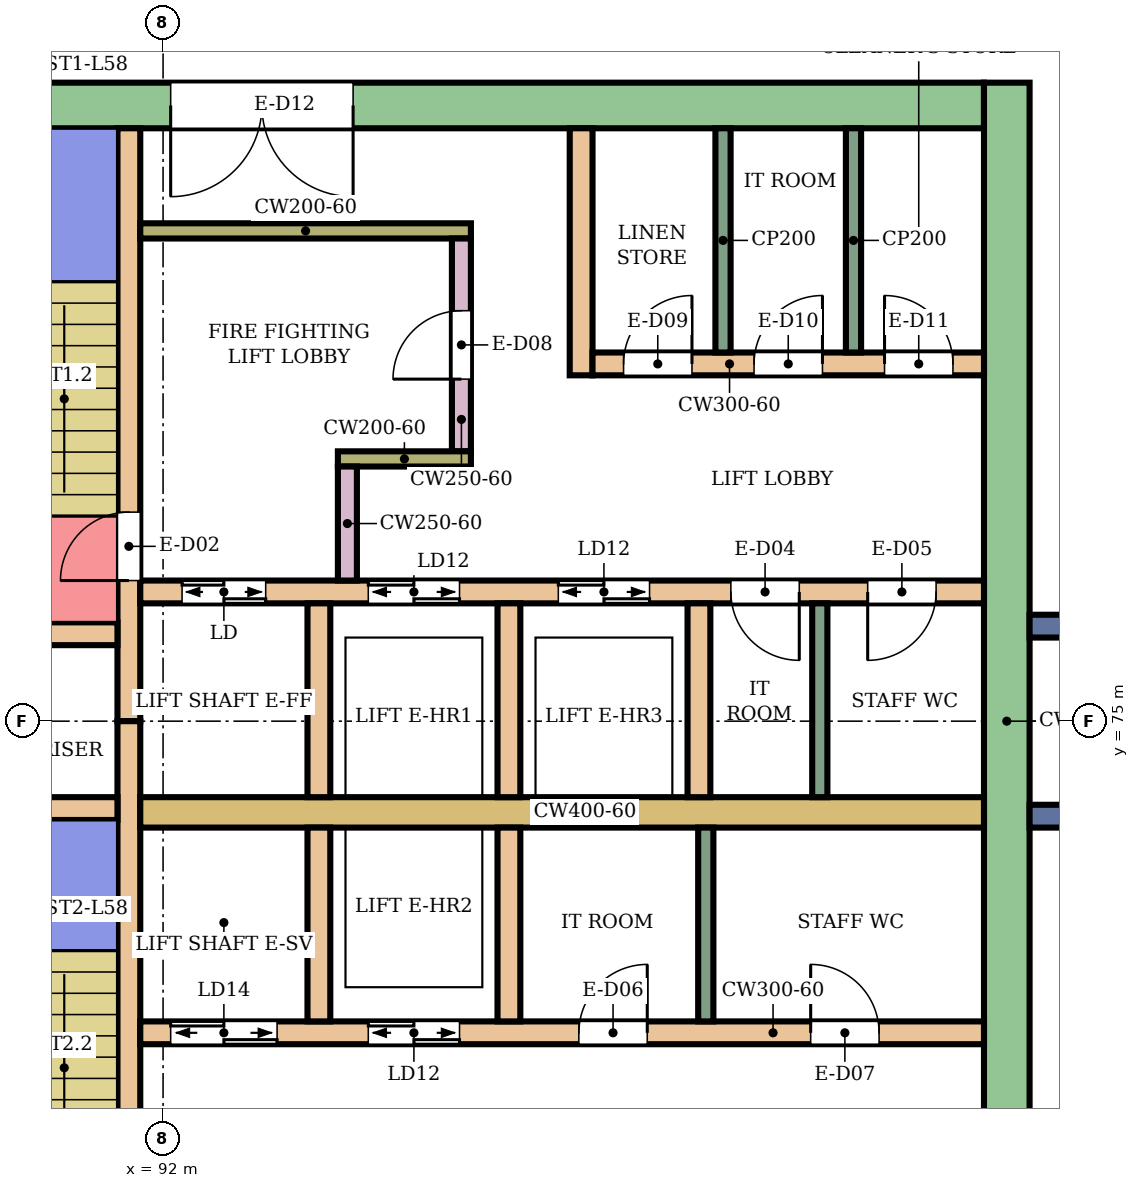
"""IFC4 building model, lengths in metres.
Left out: names, types, materials, properties, quantities, classifications, styles, units other than length and angle.
Written with IfcOpenShell. Run it as: python <this file> out.ifc"""

import sys

from ifc_helpers import new_model, si_unit, direction, frame, frame_2d, origin, place, context, subcontext, project, spatial, rectangle, extrude, element, fill, save


model = new_model("IFC4")
c1 = context("Model", 3, precision=1e-05, world=origin(), true_north=direction((0.0, 1.0)))
c2 = subcontext(c1, "Body", "Model", "MODEL_VIEW")
j1 = project(units=[si_unit("LENGTHUNIT", "METRE"), si_unit("PLANEANGLEUNIT", "RADIAN")], contexts=[c1])
p1 = place(None, origin())
s1 = spatial("IfcSite", under=j1, at=p1, CompositionType="ELEMENT")
p2 = place(p1, origin())
s2 = spatial("IfcBuilding", under=s1, at=p2, CompositionType="ELEMENT")
p3 = place(p2, frame((0.0, 0.0, 254.1)))
s3 = spatial("IfcBuildingStorey", under=s2, at=p3, CompositionType="ELEMENT", Elevation=254.1)
p4 = place(p3, frame((87.9, 83.1, 0.0), z_axis=(0.0, 0.0, 1.0), x_axis=(1.0, 0.0, 0.0)))
e1 = element("IfcWall", 1, at=p4, inside=s3, PredefinedType="SHEAR", context=c2, shape_type="SweptSolid", body=[
    extrude(rectangle(XDim=14.9, YDim=0.6, at=frame_2d((7.45, 0.0))), origin(), (0.0, 0.0, 1.0), 3.88),
])
p5 = place(p4, frame((4.2, 0.0, 0.0)))
e2 = element("IfcOpeningElement", 2, at=p5, cuts=e1, PredefinedType="OPENING", context=c2, shape_type="SweptSolid", body=[
    extrude(rectangle(XDim=2.4, YDim=2.4, at=frame_2d((1.2, 1.2))), frame((0.0, 0.31, 0.0), z_axis=(0.0, -1.0, 0.0), x_axis=(1.0, 0.0, 0.0)), (0.0, 0.0, 1.0), 0.62),
])
p6 = place(p3, frame((103.1, 66.6, 0.0), z_axis=(0.0, 0.0, 1.0), x_axis=(0.0, 1.0, 0.0)))
e3 = element("IfcWall", 3, at=p6, inside=s3, PredefinedType="SHEAR", context=c2, shape_type="SweptSolid", body=[
    extrude(rectangle(XDim=16.8, YDim=0.6, at=frame_2d((8.4, 0.0))), origin(), (0.0, 0.0, 1.0), 3.88),
])
p7 = place(p3, frame((91.55, 75.0, 0.0), z_axis=(0.0, 0.0, 1.0), x_axis=(0.0, 1.0, 0.0)))
e4 = element("IfcWall", 4, at=p7, inside=s3, PredefinedType="SHEAR", context=c2, shape_type="SweptSolid", body=[
    extrude(rectangle(XDim=7.8, YDim=0.3, at=frame_2d((3.9, 0.0))), origin(), (0.0, 0.0, 1.0), 3.88),
])
p8 = place(p7, frame((1.85, 0.0, 0.0)))
e5 = element("IfcOpeningElement", 5, at=p8, cuts=e4, PredefinedType="OPENING", context=c2, shape_type="SweptSolid", body=[
    extrude(rectangle(XDim=0.9, YDim=2.1, at=frame_2d((0.45, 1.05))), frame((0.0, 0.16, 0.0), z_axis=(0.0, -1.0, 0.0), x_axis=(1.0, 0.0, 0.0)), (0.0, 0.0, 1.0), 0.32),
])
p9 = place(p3, frame((91.55, 67.2, 0.0), z_axis=(0.0, 0.0, 1.0), x_axis=(0.0, 1.0, 0.0)))
e6 = element("IfcWall", 6, at=p9, inside=s3, PredefinedType="SHEAR", context=c2, shape_type="SweptSolid", body=[
    extrude(rectangle(XDim=7.8, YDim=0.3, at=frame_2d((3.9, 0.0))), origin(), (0.0, 0.0, 1.0), 3.88),
])
p10 = place(p9, frame((0.45, 0.0, 0.0)))
e7 = element("IfcOpeningElement", 7, at=p10, cuts=e6, PredefinedType="OPENING", context=c2, shape_type="SweptSolid", body=[
    extrude(rectangle(XDim=0.9, YDim=2.1, at=frame_2d((0.45, 1.05))), frame((0.0, 0.16, 0.0), z_axis=(0.0, -1.0, 0.0), x_axis=(1.0, 0.0, 0.0)), (0.0, 0.0, 1.0), 0.32),
])
p11 = place(p3, frame((88.35, 76.15, 0.0), z_axis=(0.0, 0.0, 1.0), x_axis=(1.0, 0.0, 0.0)))
e8 = element("IfcWall", 8, at=p11, inside=s3, PredefinedType="SHEAR", context=c2, shape_type="SweptSolid", body=[
    extrude(rectangle(XDim=3.05, YDim=0.3, at=frame_2d((1.525, 0.0))), origin(), (0.0, 0.0, 1.0), 3.88),
])
p12 = place(p11, frame((1.1, 0.0, 0.0)))
e9 = element("IfcOpeningElement", 9, at=p12, cuts=e8, PredefinedType="OPENING", context=c2, shape_type="SweptSolid", body=[
    extrude(rectangle(XDim=0.7, YDim=2.0, at=frame_2d((0.35, 1.0))), frame((0.0, 0.16, 0.0), z_axis=(0.0, -1.0, 0.0), x_axis=(1.0, 0.0, 0.0)), (0.0, 0.0, 1.0), 0.32),
])
p13 = place(p3, frame((88.35, 73.85, 0.0), z_axis=(0.0, 0.0, 1.0), x_axis=(1.0, 0.0, 0.0)))
e10 = element("IfcWall", 10, at=p13, inside=s3, PredefinedType="SHEAR", context=c2, shape_type="SweptSolid", body=[
    extrude(rectangle(XDim=3.05, YDim=0.3, at=frame_2d((1.525, 0.0))), origin(), (0.0, 0.0, 1.0), 3.88),
])
p14 = place(p3, frame((91.7, 76.7, 0.0), z_axis=(0.0, 0.0, 1.0), x_axis=(1.0, 0.0, 0.0)))
e11 = element("IfcWall", 11, at=p14, inside=s3, PredefinedType="SHEAR", context=c2, shape_type="SweptSolid", body=[
    extrude(rectangle(XDim=11.1, YDim=0.3, at=frame_2d((5.55, 0.0))), origin(), (0.0, 0.0, 1.0), 3.88),
])
p15 = place(p14, frame((0.55, 0.0, 0.0)))
e12 = element("IfcOpeningElement", 12, at=p15, cuts=e11, PredefinedType="OPENING", context=c2, shape_type="SweptSolid", body=[
    extrude(rectangle(XDim=1.1, YDim=2.1, at=frame_2d((0.55, 1.05))), frame((0.0, 0.16, 0.0), z_axis=(0.0, -1.0, 0.0), x_axis=(1.0, 0.0, 0.0)), (0.0, 0.0, 1.0), 0.32),
])
p16 = place(p14, frame((3.0, 0.0, 0.0)))
e13 = element("IfcOpeningElement", 13, at=p16, cuts=e11, PredefinedType="OPENING", context=c2, shape_type="SweptSolid", body=[
    extrude(rectangle(XDim=1.2, YDim=2.1, at=frame_2d((0.6, 1.05))), frame((0.0, 0.16, 0.0), z_axis=(0.0, -1.0, 0.0), x_axis=(1.0, 0.0, 0.0)), (0.0, 0.0, 1.0), 0.32),
])
p17 = place(p14, frame((5.5, 0.0, 0.0)))
e14 = element("IfcOpeningElement", 14, at=p17, cuts=e11, PredefinedType="OPENING", context=c2, shape_type="SweptSolid", body=[
    extrude(rectangle(XDim=1.2, YDim=2.1, at=frame_2d((0.6, 1.05))), frame((0.0, 0.16, 0.0), z_axis=(0.0, -1.0, 0.0), x_axis=(1.0, 0.0, 0.0)), (0.0, 0.0, 1.0), 0.32),
])
p18 = place(p14, frame((7.77, 0.0, 0.0)))
e15 = element("IfcOpeningElement", 15, at=p18, cuts=e11, PredefinedType="OPENING", context=c2, shape_type="SweptSolid", body=[
    extrude(rectangle(XDim=0.9, YDim=2.1, at=frame_2d((0.45, 1.05))), frame((0.0, 0.16, 0.0), z_axis=(0.0, -1.0, 0.0), x_axis=(1.0, 0.0, 0.0)), (0.0, 0.0, 1.0), 0.32),
])
p19 = place(p14, frame((9.57, 0.0, 0.0)))
e16 = element("IfcOpeningElement", 16, at=p19, cuts=e11, PredefinedType="OPENING", context=c2, shape_type="SweptSolid", body=[
    extrude(rectangle(XDim=0.9, YDim=2.1, at=frame_2d((0.45, 1.05))), frame((0.0, 0.16, 0.0), z_axis=(0.0, -1.0, 0.0), x_axis=(1.0, 0.0, 0.0)), (0.0, 0.0, 1.0), 0.32),
])
p20 = place(p3, frame((91.7, 73.8, 0.0), z_axis=(0.0, 0.0, 1.0), x_axis=(1.0, 0.0, 0.0)))
e17 = element("IfcWall", 17, at=p20, inside=s3, PredefinedType="SHEAR", context=c2, shape_type="SweptSolid", body=[
    extrude(rectangle(XDim=11.1, YDim=0.4, at=frame_2d((5.55, 0.0))), origin(), (0.0, 0.0, 1.0), 3.88),
])
p21 = place(p3, frame((91.7, 70.9, 0.0), z_axis=(0.0, 0.0, 1.0), x_axis=(1.0, 0.0, 0.0)))
e18 = element("IfcWall", 18, at=p21, inside=s3, PredefinedType="SHEAR", context=c2, shape_type="SweptSolid", body=[
    extrude(rectangle(XDim=11.1, YDim=0.3, at=frame_2d((5.55, 0.0))), origin(), (0.0, 0.0, 1.0), 3.88),
])
p22 = place(p21, frame((0.4, 0.0, 0.0)))
e19 = element("IfcOpeningElement", 19, at=p22, cuts=e18, PredefinedType="OPENING", context=c2, shape_type="SweptSolid", body=[
    extrude(rectangle(XDim=1.4, YDim=2.1, at=frame_2d((0.7, 1.05))), frame((0.0, 0.16, 0.0), z_axis=(0.0, -1.0, 0.0), x_axis=(1.0, 0.0, 0.0)), (0.0, 0.0, 1.0), 0.32),
])
p23 = place(p21, frame((3.0, 0.0, 0.0)))
e20 = element("IfcOpeningElement", 20, at=p23, cuts=e18, PredefinedType="OPENING", context=c2, shape_type="SweptSolid", body=[
    extrude(rectangle(XDim=1.2, YDim=2.1, at=frame_2d((0.6, 1.05))), frame((0.0, 0.16, 0.0), z_axis=(0.0, -1.0, 0.0), x_axis=(1.0, 0.0, 0.0)), (0.0, 0.0, 1.0), 0.32),
])
p24 = place(p21, frame((5.77, 0.0, 0.0)))
e21 = element("IfcOpeningElement", 21, at=p24, cuts=e18, PredefinedType="OPENING", context=c2, shape_type="SweptSolid", body=[
    extrude(rectangle(XDim=0.9, YDim=2.1, at=frame_2d((0.45, 1.05))), frame((0.0, 0.16, 0.0), z_axis=(0.0, -1.0, 0.0), x_axis=(1.0, 0.0, 0.0)), (0.0, 0.0, 1.0), 0.32),
])
p25 = place(p21, frame((8.82, 0.0, 0.0)))
e22 = element("IfcOpeningElement", 22, at=p25, cuts=e18, PredefinedType="OPENING", context=c2, shape_type="SweptSolid", body=[
    extrude(rectangle(XDim=0.9, YDim=2.1, at=frame_2d((0.45, 1.05))), frame((0.0, 0.16, 0.0), z_axis=(0.0, -1.0, 0.0), x_axis=(1.0, 0.0, 0.0)), (0.0, 0.0, 1.0), 0.32),
])
for number, where, z_axis, x_axis in (
    (23, (94.05, 74.0, 0.0), (0.0, 0.0, 1.0), (0.0, 1.0, 0.0)),
    (24, (96.55, 74.0, 0.0), (0.0, 0.0, 1.0), (0.0, 1.0, 0.0)),
    (25, (99.05, 74.0, 0.0), (0.0, 0.0, 1.0), (0.0, 1.0, 0.0)),
    (26, (94.05, 71.05, 0.0), (0.0, 0.0, 1.0), (0.0, 1.0, 0.0)),
    (27, (96.55, 71.05, 0.0), (0.0, 0.0, 1.0), (0.0, 1.0, 0.0)),
):
    element("IfcWall", number, at=place(p3, frame(where, z_axis=z_axis, x_axis=x_axis)), inside=s3, PredefinedType="SHEAR", context=c2, shape_type="SweptSolid", body=[
        extrude(rectangle(XDim=2.55, YDim=0.3, at=frame_2d((1.275, 0.0))), origin(), (0.0, 0.0, 1.0), 3.88),
    ])
p26 = place(p3, frame((91.7, 81.45, 0.0), z_axis=(0.0, 0.0, 1.0), x_axis=(1.0, 0.0, 0.0)))
e28 = element("IfcWall", 28, at=p26, inside=s3, PredefinedType="SHEAR", context=c2, shape_type="SweptSolid", body=[
    extrude(rectangle(XDim=4.35, YDim=0.2, at=frame_2d((2.175, 0.0))), origin(), (0.0, 0.0, 1.0), 3.88),
])
p27 = place(p3, frame((95.925, 78.55, 0.0), z_axis=(0.0, 0.0, 1.0), x_axis=(0.0, 1.0, 0.0)))
e29 = element("IfcWall", 29, at=p27, inside=s3, PredefinedType="SHEAR", context=c2, shape_type="SweptSolid", body=[
    extrude(rectangle(XDim=2.8, YDim=0.25, at=frame_2d((1.4, 0.0))), origin(), (0.0, 0.0, 1.0), 3.88),
])
p28 = place(p27, frame((0.95, 0.0, 0.0)))
e30 = element("IfcOpeningElement", 30, at=p28, cuts=e29, PredefinedType="OPENING", context=c2, shape_type="SweptSolid", body=[
    extrude(rectangle(XDim=0.9, YDim=2.1, at=frame_2d((0.45, 1.05))), frame((0.0, 0.135, 0.0), z_axis=(0.0, -1.0, 0.0), x_axis=(1.0, 0.0, 0.0)), (0.0, 0.0, 1.0), 0.27),
])
p29 = place(p3, frame((94.3, 78.45, 0.0), z_axis=(0.0, 0.0, 1.0), x_axis=(1.0, 0.0, 0.0)))
e31 = element("IfcWall", 31, at=p29, inside=s3, PredefinedType="SHEAR", context=c2, shape_type="SweptSolid", body=[
    extrude(rectangle(XDim=1.75, YDim=0.2, at=frame_2d((0.875, 0.0))), origin(), (0.0, 0.0, 1.0), 3.88),
])
p30 = place(p3, frame((94.425, 76.85, 0.0), z_axis=(0.0, 0.0, 1.0), x_axis=(0.0, 1.0, 0.0)))
e32 = element("IfcWall", 32, at=p30, inside=s3, PredefinedType="SHEAR", context=c2, shape_type="SweptSolid", body=[
    extrude(rectangle(XDim=1.5, YDim=0.25, at=frame_2d((0.75, 0.0))), origin(), (0.0, 0.0, 1.0), 3.88),
])
p31 = place(p3, frame((97.5, 79.55, 0.0), z_axis=(0.0, 0.0, 1.0), x_axis=(0.0, 1.0, 0.0)))
e33 = element("IfcWall", 33, at=p31, inside=s3, PredefinedType="SHEAR", context=c2, shape_type="SweptSolid", body=[
    extrude(rectangle(XDim=3.25, YDim=0.3, at=frame_2d((1.625, 0.0))), origin(), (0.0, 0.0, 1.0), 3.88),
])
p32 = place(p3, frame((97.65, 79.7, 0.0), z_axis=(0.0, 0.0, 1.0), x_axis=(1.0, 0.0, 0.0)))
e34 = element("IfcWall", 34, at=p32, inside=s3, PredefinedType="SHEAR", context=c2, shape_type="SweptSolid", body=[
    extrude(rectangle(XDim=5.15, YDim=0.3, at=frame_2d((2.575, 0.0))), origin(), (0.0, 0.0, 1.0), 3.88),
])
p33 = place(p32, frame((0.408, 0.0, 0.0)))
e35 = element("IfcOpeningElement", 35, at=p33, cuts=e34, PredefinedType="OPENING", context=c2, shape_type="SweptSolid", body=[
    extrude(rectangle(XDim=0.9, YDim=2.1, at=frame_2d((0.45, 1.05))), frame((0.0, 0.16, 0.0), z_axis=(0.0, -1.0, 0.0), x_axis=(1.0, 0.0, 0.0)), (0.0, 0.0, 1.0), 0.32),
])
p34 = place(p32, frame((2.125, 0.0, 0.0)))
e36 = element("IfcOpeningElement", 36, at=p34, cuts=e34, PredefinedType="OPENING", context=c2, shape_type="SweptSolid", body=[
    extrude(rectangle(XDim=0.9, YDim=2.1, at=frame_2d((0.45, 1.05))), frame((0.0, 0.16, 0.0), z_axis=(0.0, -1.0, 0.0), x_axis=(1.0, 0.0, 0.0)), (0.0, 0.0, 1.0), 0.32),
])
p35 = place(p32, frame((3.842, 0.0, 0.0)))
e37 = element("IfcOpeningElement", 37, at=p35, cuts=e34, PredefinedType="OPENING", context=c2, shape_type="SweptSolid", body=[
    extrude(rectangle(XDim=0.9, YDim=2.1, at=frame_2d((0.45, 1.05))), frame((0.0, 0.16, 0.0), z_axis=(0.0, -1.0, 0.0), x_axis=(1.0, 0.0, 0.0)), (0.0, 0.0, 1.0), 0.32),
])
for number, where, z_axis, x_axis in (
    (38, (103.4, 73.75, 0.0), (0.0, 0.0, 1.0), (1.0, 0.0, 0.0)),
    (39, (103.4, 76.25, 0.0), (0.0, 0.0, 1.0), (1.0, 0.0, 0.0)),
):
    element("IfcWall", number, at=place(p3, frame(where, z_axis=z_axis, x_axis=x_axis)), inside=s3, PredefinedType="NOTDEFINED", context=c2, shape_type="SweptSolid", body=[
        extrude(rectangle(XDim=2.416, YDim=0.3, at=frame_2d((1.208, 0.0))), origin(), (0.0, 0.0, 1.0), 4.2),
    ])
for number, where, z_axis, x_axis in (
    (40, (100.64, 74.0, 0.0), (0.0, 0.0, 1.0), (0.0, 1.0, 0.0)),
    (41, (99.14, 71.05, 0.0), (0.0, 0.0, 1.0), (0.0, 1.0, 0.0)),
):
    element("IfcWall", number, at=place(p3, frame(where, z_axis=z_axis, x_axis=x_axis)), inside=s3, PredefinedType="PARTITIONING", context=c2, shape_type="SweptSolid", body=[
        extrude(rectangle(XDim=2.55, YDim=0.2, at=frame_2d((1.275, 0.0))), origin(), (0.0, 0.0, 1.0), 3.88),
    ])
for number, where, z_axis, x_axis in (
    (42, (99.367, 79.85, 0.0), (0.0, 0.0, 1.0), (0.0, 1.0, 0.0)),
    (43, (101.083, 79.85, 0.0), (0.0, 0.0, 1.0), (0.0, 1.0, 0.0)),
):
    element("IfcWall", number, at=place(p3, frame(where, z_axis=z_axis, x_axis=x_axis)), inside=s3, PredefinedType="PARTITIONING", context=c2, shape_type="SweptSolid", body=[
        extrude(rectangle(XDim=2.95, YDim=0.2, at=frame_2d((1.475, 0.0))), origin(), (0.0, 0.0, 1.0), 3.88),
    ])
p36 = place(p8, origin())
e44 = element("IfcDoor", 44, at=p36, inside=s3, OperationType="SINGLE_SWING_LEFT", PredefinedType="DOOR", context=c2, shape_type="SweptSolid", body=[
    extrude(rectangle(XDim=0.9, YDim=2.1, at=frame_2d((0.45, 1.05))), frame((0.0, 0.025, 0.0), z_axis=(0.0, -1.0, 0.0), x_axis=(1.0, 0.0, 0.0)), (0.0, 0.0, 1.0), 0.05),
])
fill(e5, e44)
p37 = place(p15, origin())
e45 = element("IfcDoor", 45, at=p37, inside=s3, OperationType="DOUBLE_DOOR_SLIDING", PredefinedType="DOOR", context=c2, shape_type="SweptSolid", body=[
    extrude(rectangle(XDim=1.1, YDim=2.1, at=frame_2d((0.55, 1.05))), frame((0.0, 0.025, 0.0), z_axis=(0.0, -1.0, 0.0), x_axis=(1.0, 0.0, 0.0)), (0.0, 0.0, 1.0), 0.05),
])
fill(e12, e45)
p38 = place(p16, origin())
e46 = element("IfcDoor", 46, at=p38, inside=s3, OperationType="DOUBLE_DOOR_SLIDING", PredefinedType="DOOR", context=c2, shape_type="SweptSolid", body=[
    extrude(rectangle(XDim=1.2, YDim=2.1, at=frame_2d((0.6, 1.05))), frame((0.0, 0.025, 0.0), z_axis=(0.0, -1.0, 0.0), x_axis=(1.0, 0.0, 0.0)), (0.0, 0.0, 1.0), 0.05),
])
fill(e13, e46)
p39 = place(p17, origin())
e47 = element("IfcDoor", 47, at=p39, inside=s3, OperationType="DOUBLE_DOOR_SLIDING", PredefinedType="DOOR", context=c2, shape_type="SweptSolid", body=[
    extrude(rectangle(XDim=1.2, YDim=2.1, at=frame_2d((0.6, 1.05))), frame((0.0, 0.025, 0.0), z_axis=(0.0, -1.0, 0.0), x_axis=(1.0, 0.0, 0.0)), (0.0, 0.0, 1.0), 0.05),
])
fill(e14, e47)
p40 = place(p18, frame((0.9, 0.0, 0.0), z_axis=(0.0, 0.0, 1.0), x_axis=(-1.0, 0.0, 0.0)))
e48 = element("IfcDoor", 48, at=p40, inside=s3, OperationType="SINGLE_SWING_LEFT", PredefinedType="DOOR", context=c2, shape_type="SweptSolid", body=[
    extrude(rectangle(XDim=0.9, YDim=2.1, at=frame_2d((0.45, 1.05))), frame((0.0, 0.025, 0.0), z_axis=(0.0, -1.0, 0.0), x_axis=(1.0, 0.0, 0.0)), (0.0, 0.0, 1.0), 0.05),
])
fill(e15, e48)
p41 = place(p19, frame((0.9, 0.0, 0.0), z_axis=(0.0, 0.0, 1.0), x_axis=(-1.0, 0.0, 0.0)))
e49 = element("IfcDoor", 49, at=p41, inside=s3, OperationType="SINGLE_SWING_RIGHT", PredefinedType="DOOR", context=c2, shape_type="SweptSolid", body=[
    extrude(rectangle(XDim=0.9, YDim=2.1, at=frame_2d((0.45, 1.05))), frame((0.0, 0.025, 0.0), z_axis=(0.0, -1.0, 0.0), x_axis=(1.0, 0.0, 0.0)), (0.0, 0.0, 1.0), 0.05),
])
fill(e16, e49)
p42 = place(p22, origin())
e50 = element("IfcDoor", 50, at=p42, inside=s3, OperationType="DOUBLE_DOOR_SLIDING", PredefinedType="DOOR", context=c2, shape_type="SweptSolid", body=[
    extrude(rectangle(XDim=1.4, YDim=2.1, at=frame_2d((0.7, 1.05))), frame((0.0, 0.025, 0.0), z_axis=(0.0, -1.0, 0.0), x_axis=(1.0, 0.0, 0.0)), (0.0, 0.0, 1.0), 0.05),
])
fill(e19, e50)
p43 = place(p23, origin())
e51 = element("IfcDoor", 51, at=p43, inside=s3, OperationType="DOUBLE_DOOR_SLIDING", PredefinedType="DOOR", context=c2, shape_type="SweptSolid", body=[
    extrude(rectangle(XDim=1.2, YDim=2.1, at=frame_2d((0.6, 1.05))), frame((0.0, 0.025, 0.0), z_axis=(0.0, -1.0, 0.0), x_axis=(1.0, 0.0, 0.0)), (0.0, 0.0, 1.0), 0.05),
])
fill(e20, e51)
p44 = place(p24, origin())
e52 = element("IfcDoor", 52, at=p44, inside=s3, OperationType="SINGLE_SWING_RIGHT", PredefinedType="DOOR", context=c2, shape_type="SweptSolid", body=[
    extrude(rectangle(XDim=0.9, YDim=2.1, at=frame_2d((0.45, 1.05))), frame((0.0, 0.025, 0.0), z_axis=(0.0, -1.0, 0.0), x_axis=(1.0, 0.0, 0.0)), (0.0, 0.0, 1.0), 0.05),
])
fill(e21, e52)
p45 = place(p25, origin())
e53 = element("IfcDoor", 53, at=p45, inside=s3, OperationType="SINGLE_SWING_LEFT", PredefinedType="DOOR", context=c2, shape_type="SweptSolid", body=[
    extrude(rectangle(XDim=0.9, YDim=2.1, at=frame_2d((0.45, 1.05))), frame((0.0, 0.025, 0.0), z_axis=(0.0, -1.0, 0.0), x_axis=(1.0, 0.0, 0.0)), (0.0, 0.0, 1.0), 0.05),
])
fill(e22, e53)
p46 = place(p28, origin())
e54 = element("IfcDoor", 54, at=p46, inside=s3, OperationType="SINGLE_SWING_LEFT", PredefinedType="DOOR", context=c2, shape_type="SweptSolid", body=[
    extrude(rectangle(XDim=0.9, YDim=2.1, at=frame_2d((0.45, 1.05))), frame((0.0, 0.025, 0.0), z_axis=(0.0, -1.0, 0.0), x_axis=(1.0, 0.0, 0.0)), (0.0, 0.0, 1.0), 0.05),
])
fill(e30, e54)
p47 = place(p33, origin())
e55 = element("IfcDoor", 55, at=p47, inside=s3, OperationType="SINGLE_SWING_RIGHT", PredefinedType="DOOR", context=c2, shape_type="SweptSolid", body=[
    extrude(rectangle(XDim=0.9, YDim=2.1, at=frame_2d((0.45, 1.05))), frame((0.0, 0.025, 0.0), z_axis=(0.0, -1.0, 0.0), x_axis=(1.0, 0.0, 0.0)), (0.0, 0.0, 1.0), 0.05),
])
fill(e35, e55)
p48 = place(p34, origin())
e56 = element("IfcDoor", 56, at=p48, inside=s3, OperationType="SINGLE_SWING_RIGHT", PredefinedType="DOOR", context=c2, shape_type="SweptSolid", body=[
    extrude(rectangle(XDim=0.9, YDim=2.1, at=frame_2d((0.45, 1.05))), frame((0.0, 0.025, 0.0), z_axis=(0.0, -1.0, 0.0), x_axis=(1.0, 0.0, 0.0)), (0.0, 0.0, 1.0), 0.05),
])
fill(e36, e56)
p49 = place(p35, origin())
e57 = element("IfcDoor", 57, at=p49, inside=s3, OperationType="SINGLE_SWING_LEFT", PredefinedType="DOOR", context=c2, shape_type="SweptSolid", body=[
    extrude(rectangle(XDim=0.9, YDim=2.1, at=frame_2d((0.45, 1.05))), frame((0.0, 0.025, 0.0), z_axis=(0.0, -1.0, 0.0), x_axis=(1.0, 0.0, 0.0)), (0.0, 0.0, 1.0), 0.05),
])
fill(e37, e57)
p50 = place(p5, frame((2.4, 0.0, 0.0), z_axis=(0.0, 0.0, 1.0), x_axis=(-1.0, 0.0, 0.0)))
e58 = element("IfcDoor", 58, at=p50, inside=s3, OperationType="DOUBLE_DOOR_SINGLE_SWING", PredefinedType="DOOR", context=c2, shape_type="SweptSolid", body=[
    extrude(rectangle(XDim=2.4, YDim=2.4, at=frame_2d((1.2, 1.2))), frame((0.0, 0.025, 0.0), z_axis=(0.0, -1.0, 0.0), x_axis=(1.0, 0.0, 0.0)), (0.0, 0.0, 1.0), 0.05),
])
fill(e2, e58)
save(model, sys.argv[1])
